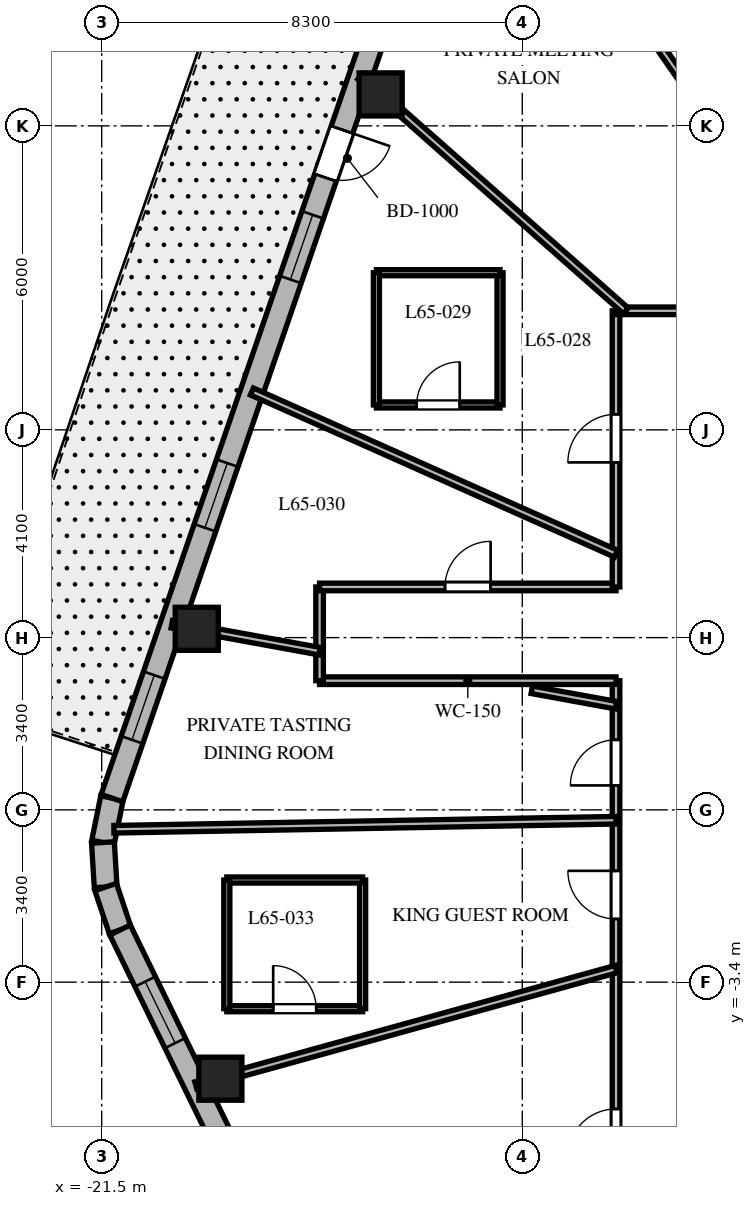
"""IFC4 building model, lengths in metres.
Left out: names, types, materials, properties, quantities, classifications, styles, units other than length and angle.
Written with IfcOpenShell. Run it as: python <this file> out.ifc"""

import sys

from ifc_helpers import new_model, si_unit, direction, frame, frame_2d, origin, origin_2d, place, context, subcontext, project, spatial, rectangle, extrude, element, fill, save


model = new_model("IFC4")
c1 = context("Model", 3, precision=1e-05, world=origin(), true_north=direction((0.0, 1.0)))
c2 = subcontext(c1, "Body", "Model", "MODEL_VIEW")
j1 = project(units=[si_unit("LENGTHUNIT", "METRE"), si_unit("PLANEANGLEUNIT", "RADIAN")], contexts=[c1])
p1 = place(None, origin())
s1 = spatial("IfcSite", under=j1, at=p1, CompositionType="ELEMENT")
p2 = place(p1, origin())
s2 = spatial("IfcBuilding", under=s1, at=p2, CompositionType="ELEMENT")
p3 = place(p2, frame((0.0, 0.0, 261.3)))
s3 = spatial("IfcBuildingStorey", under=s2, at=p3, CompositionType="ELEMENT", Elevation=261.3)
for number, where, z_axis, x_axis in (
    (1, (-15.995, 14.121, 0.0), (0.0, 0.0, 1.0), (1.0, 0.0, 0.0)),
    (2, (-19.624, 3.574, 0.0), (0.0, 0.0, 1.0), (1.0, 0.0, 0.0)),
    (3, (-19.158, -5.305, 0.0), (0.0, 0.0, 1.0), (1.0, 0.0, 0.0)),
):
    element("IfcColumn", number, at=place(p3, frame(where, z_axis=z_axis, x_axis=x_axis)), inside=s3, PredefinedType="COLUMN", context=c2, shape_type="SweptSolid", body=[
        extrude(rectangle(XDim=0.85, YDim=0.85, at=origin_2d()), origin(), (0.0, 0.0, 1.0), 3.9),
    ])
p4 = place(p3, frame((-21.298, 0.233, 0.0), z_axis=(0.0, 0.0, 1.0), x_axis=(-0.199158176661, -0.979967356941, 0.0)))
e4 = element("IfcWall", 4, at=p4, inside=s3, PredefinedType="SOLIDWALL", context=c2, shape_type="SweptSolid", body=[
    extrude(rectangle(XDim=0.895, YDim=0.45, at=frame_2d((0.447, 0.0))), origin(), (0.0, 0.0, 1.0), 3.6),
])
p5 = place(p3, frame((-21.476, -0.644, 0.0), z_axis=(0.0, 0.0, 1.0), x_axis=(0.061031097918, -0.998135865044, 0.0)))
e5 = element("IfcWall", 5, at=p5, inside=s3, PredefinedType="SOLIDWALL", context=c2, shape_type="SweptSolid", body=[
    extrude(rectangle(XDim=0.88, YDim=0.45, at=frame_2d((0.44, 0.0))), origin(), (0.0, 0.0, 1.0), 3.6),
])
p6 = place(p3, frame((-21.422, -1.522, 0.0), z_axis=(0.0, 0.0, 1.0), x_axis=(0.316964162323, -0.94843751497, 0.0)))
e6 = element("IfcWall", 6, at=p6, inside=s3, PredefinedType="SOLIDWALL", context=c2, shape_type="SweptSolid", body=[
    extrude(rectangle(XDim=0.895, YDim=0.45, at=frame_2d((0.448, 0.0))), origin(), (0.0, 0.0, 1.0), 3.6),
])
p7 = place(p3, frame((-15.26, 17.776, 0.0), z_axis=(0.0, 0.0, 1.0), x_axis=(-0.325407437101, -0.945573899745, 0.0)))
e7 = element("IfcWall", 7, at=p7, inside=s3, PredefinedType="SOLIDWALL", context=c2, shape_type="SweptSolid", body=[
    extrude(rectangle(XDim=18.552, YDim=0.45, at=frame_2d((9.276, 0.0))), origin(), (0.0, 0.0, 1.0), 3.6),
])
p8 = place(p7, frame((4.602, 0.0, 0.0)))
e8 = element("IfcOpeningElement", 8, at=p8, cuts=e7, PredefinedType="OPENING", context=c2, shape_type="SweptSolid", body=[
    extrude(rectangle(XDim=1.0, YDim=2.15, at=frame_2d((0.5, 1.075))), frame((0.0, 0.235, 0.0), z_axis=(0.0, -1.0, 0.0), x_axis=(1.0, 0.0, 0.0)), (0.0, 0.0, 1.0), 0.47),
])
p9 = place(p7, frame((1.161, 0.0, 0.8)))
e9 = element("IfcOpeningElement", 9, at=p9, cuts=e7, PredefinedType="OPENING", context=c2, shape_type="SweptSolid", body=[
    extrude(rectangle(XDim=1.35, YDim=1.75, at=frame_2d((0.675, 0.875))), frame((0.0, 0.235, 0.0), z_axis=(0.0, -1.0, 0.0), x_axis=(1.0, 0.0, 0.0)), (0.0, 0.0, 1.0), 0.47),
])
p10 = place(p7, frame((6.379, 0.0, 0.8)))
e10 = element("IfcOpeningElement", 10, at=p10, cuts=e7, PredefinedType="OPENING", context=c2, shape_type="SweptSolid", body=[
    extrude(rectangle(XDim=1.35, YDim=1.75, at=frame_2d((0.675, 0.875))), frame((0.0, 0.235, 0.0), z_axis=(0.0, -1.0, 0.0), x_axis=(1.0, 0.0, 0.0)), (0.0, 0.0, 1.0), 0.47),
])
p11 = place(p7, frame((11.561, 0.0, 0.8)))
e11 = element("IfcOpeningElement", 11, at=p11, cuts=e7, PredefinedType="OPENING", context=c2, shape_type="SweptSolid", body=[
    extrude(rectangle(XDim=1.35, YDim=1.75, at=frame_2d((0.675, 0.875))), frame((0.0, 0.235, 0.0), z_axis=(0.0, -1.0, 0.0), x_axis=(1.0, 0.0, 0.0)), (0.0, 0.0, 1.0), 0.47),
])
p12 = place(p7, frame((15.987, 0.0, 0.8)))
e12 = element("IfcOpeningElement", 12, at=p12, cuts=e7, PredefinedType="OPENING", context=c2, shape_type="SweptSolid", body=[
    extrude(rectangle(XDim=1.35, YDim=1.75, at=frame_2d((0.675, 0.875))), frame((0.0, 0.235, 0.0), z_axis=(0.0, -1.0, 0.0), x_axis=(1.0, 0.0, 0.0)), (0.0, 0.0, 1.0), 0.47),
])
p13 = place(p3, frame((-21.138, -2.371, 0.0), z_axis=(0.0, 0.0, 1.0), x_axis=(0.438128124058, -0.89891253574, 0.0)))
e13 = element("IfcWall", 13, at=p13, inside=s3, PredefinedType="SOLIDWALL", context=c2, shape_type="SweptSolid", body=[
    extrude(rectangle(XDim=17.565, YDim=0.45, at=frame_2d((8.782, 0.0))), origin(), (0.0, 0.0, 1.0), 3.6),
])
p14 = place(p13, frame((1.133, 0.0, 0.8)))
e14 = element("IfcOpeningElement", 14, at=p14, cuts=e13, PredefinedType="OPENING", context=c2, shape_type="SweptSolid", body=[
    extrude(rectangle(XDim=1.35, YDim=1.75, at=frame_2d((0.675, 0.875))), frame((0.0, 0.235, 0.0), z_axis=(0.0, -1.0, 0.0), x_axis=(1.0, 0.0, 0.0)), (0.0, 0.0, 1.0), 0.47),
])
p15 = place(p13, frame((8.158, 0.0, 0.8)))
e15 = element("IfcOpeningElement", 15, at=p15, cuts=e13, PredefinedType="OPENING", context=c2, shape_type="SweptSolid", body=[
    extrude(rectangle(XDim=1.35, YDim=1.75, at=frame_2d((0.675, 0.875))), frame((0.0, 0.235, 0.0), z_axis=(0.0, -1.0, 0.0), x_axis=(1.0, 0.0, 0.0)), (0.0, 0.0, 1.0), 0.47),
])
p16 = place(p13, frame((15.132, 0.0, 0.8)))
e16 = element("IfcOpeningElement", 16, at=p16, cuts=e13, PredefinedType="OPENING", context=c2, shape_type="SweptSolid", body=[
    extrude(rectangle(XDim=1.35, YDim=1.75, at=frame_2d((0.675, 0.875))), frame((0.0, 0.235, 0.0), z_axis=(0.0, -1.0, 0.0), x_axis=(1.0, 0.0, 0.0)), (0.0, 0.0, 1.0), 0.47),
])
p17 = place(p3, frame((-11.35, -9.85, 0.0), z_axis=(0.0, 0.0, 1.0), x_axis=(0.0, 1.0, 0.0)))
e17 = element("IfcWall", 17, at=p17, inside=s3, PredefinedType="PARTITIONING", context=c2, shape_type="SweptSolid", body=[
    extrude(rectangle(XDim=12.4, YDim=0.15, at=frame_2d((6.2, 0.0))), origin(), (0.0, 0.0, 1.0), 3.09),
])
p18 = place(p17, frame((10.333, 0.0, 0.0)))
e18 = element("IfcOpeningElement", 18, at=p18, cuts=e17, PredefinedType="OPENING", context=c2, shape_type="SweptSolid", body=[
    extrude(rectangle(XDim=0.9, YDim=2.03, at=frame_2d((0.45, 1.015))), frame((0.0, 0.085, 0.0), z_axis=(0.0, -1.0, 0.0), x_axis=(1.0, 0.0, 0.0)), (0.0, 0.0, 1.0), 0.17),
])
p19 = place(p17, frame((7.697, 0.0, 0.0)))
e19 = element("IfcOpeningElement", 19, at=p19, cuts=e17, PredefinedType="OPENING", context=c2, shape_type="SweptSolid", body=[
    extrude(rectangle(XDim=0.95, YDim=2.03, at=frame_2d((0.475, 1.015))), frame((0.0, 0.085, 0.0), z_axis=(0.0, -1.0, 0.0), x_axis=(1.0, 0.0, 0.0)), (0.0, 0.0, 1.0), 0.17),
])
p20 = place(p17, frame((2.998, 0.0, 0.0)))
e20 = element("IfcOpeningElement", 20, at=p20, cuts=e17, PredefinedType="OPENING", context=c2, shape_type="SweptSolid", body=[
    extrude(rectangle(XDim=0.95, YDim=2.03, at=frame_2d((0.475, 1.015))), frame((0.0, 0.085, 0.0), z_axis=(0.0, -1.0, 0.0), x_axis=(1.0, 0.0, 0.0)), (0.0, 0.0, 1.0), 0.17),
])
p21 = place(p3, frame((-11.35, 2.55, 0.0), z_axis=(0.0, 0.0, 1.0), x_axis=(-1.0, 0.0, 0.0)))
e21 = element("IfcWall", 21, at=p21, inside=s3, PredefinedType="PARTITIONING", context=c2, shape_type="SweptSolid", body=[
    extrude(rectangle(XDim=5.85, YDim=0.15, at=frame_2d((2.925, 0.0))), origin(), (0.0, 0.0, 1.0), 3.041),
])
p22 = place(p3, frame((-17.2, 2.55, 0.0), z_axis=(0.0, 0.0, 1.0), x_axis=(0.0, 1.0, 0.0)))
e22 = element("IfcWall", 22, at=p22, inside=s3, PredefinedType="PARTITIONING", context=c2, shape_type="SweptSolid", body=[
    extrude(rectangle(XDim=1.85, YDim=0.15, at=frame_2d((0.925, 0.0))), origin(), (0.0, 0.0, 1.0), 3.09),
])
p23 = place(p3, frame((-17.2, 4.4, 0.0), z_axis=(0.0, 0.0, 1.0), x_axis=(1.0, 0.0, 0.0)))
e23 = element("IfcWall", 23, at=p23, inside=s3, PredefinedType="PARTITIONING", context=c2, shape_type="SweptSolid", body=[
    extrude(rectangle(XDim=5.85, YDim=0.15, at=frame_2d((2.925, 0.0))), origin(), (0.0, 0.0, 1.0), 3.041),
])
p24 = place(p23, frame((2.475, 0.0, 0.0)))
e24 = element("IfcOpeningElement", 24, at=p24, cuts=e23, PredefinedType="OPENING", context=c2, shape_type="SweptSolid", body=[
    extrude(rectangle(XDim=0.9, YDim=2.03, at=frame_2d((0.45, 1.015))), frame((0.0, 0.085, 0.0), z_axis=(0.0, -1.0, 0.0), x_axis=(1.0, 0.0, 0.0)), (0.0, 0.0, 1.0), 0.17),
])
p25 = place(p3, frame((-11.35, 4.4, 0.0), z_axis=(0.0, 0.0, 1.0), x_axis=(0.0, 1.0, 0.0)))
e25 = element("IfcWall", 25, at=p25, inside=s3, PredefinedType="PARTITIONING", context=c2, shape_type="SweptSolid", body=[
    extrude(rectangle(XDim=5.45, YDim=0.15, at=frame_2d((2.725, 0.0))), origin(), (0.0, 0.0, 1.0), 3.09),
])
p26 = place(p25, frame((2.458, 0.0, 0.0)))
e26 = element("IfcOpeningElement", 26, at=p26, cuts=e25, PredefinedType="OPENING", context=c2, shape_type="SweptSolid", body=[
    extrude(rectangle(XDim=0.95, YDim=2.03, at=frame_2d((0.475, 1.015))), frame((0.0, 0.085, 0.0), z_axis=(0.0, -1.0, 0.0), x_axis=(1.0, 0.0, 0.0)), (0.0, 0.0, 1.0), 0.17),
])
p27 = place(p3, frame((-11.35, 9.85, 0.0), z_axis=(0.0, 0.0, 1.0), x_axis=(1.0, 0.0, 0.0)))
e27 = element("IfcWall", 27, at=p27, inside=s3, PredefinedType="PARTITIONING", context=c2, shape_type="SweptSolid", body=[
    extrude(rectangle(XDim=10.43, YDim=0.15, at=frame_2d((5.215, 0.0))), origin(), (0.0, 0.0, 1.0), 3.09),
])
p28 = place(p27, frame((8.382, 0.0, 0.0)))
e28 = element("IfcOpeningElement", 28, at=p28, cuts=e27, PredefinedType="OPENING", context=c2, shape_type="SweptSolid", body=[
    extrude(rectangle(XDim=0.95, YDim=2.03, at=frame_2d((0.475, 1.015))), frame((0.0, 0.085, 0.0), z_axis=(0.0, -1.0, 0.0), x_axis=(1.0, 0.0, 0.0)), (0.0, 0.0, 1.0), 0.17),
])
p29 = place(p27, frame((5.541, 0.0, 0.0)))
e29 = element("IfcOpeningElement", 29, at=p29, cuts=e27, PredefinedType="OPENING", context=c2, shape_type="SweptSolid", body=[
    extrude(rectangle(XDim=0.9, YDim=2.03, at=frame_2d((0.45, 1.015))), frame((0.0, 0.085, 0.0), z_axis=(0.0, -1.0, 0.0), x_axis=(1.0, 0.0, 0.0)), (0.0, 0.0, 1.0), 0.17),
])
p30 = place(p27, frame((1.916, 0.0, 0.0)))
e30 = element("IfcOpeningElement", 30, at=p30, cuts=e27, PredefinedType="OPENING", context=c2, shape_type="SweptSolid", body=[
    extrude(rectangle(XDim=0.9, YDim=2.03, at=frame_2d((0.45, 1.015))), frame((0.0, 0.085, 0.0), z_axis=(0.0, -1.0, 0.0), x_axis=(1.0, 0.0, 0.0)), (0.0, 0.0, 1.0), 0.17),
])
p31 = place(p3, frame((-6.858, 9.85, 0.0), z_axis=(0.0, 0.0, 1.0), x_axis=(-0.571391702066, 0.820677477948, 0.0)))
e31 = element("IfcWall", 31, at=p31, inside=s3, PredefinedType="PARTITIONING", context=c2, shape_type="SweptSolid", body=[
    extrude(rectangle(XDim=11.738, YDim=0.15, at=frame_2d((5.869, 0.0))), origin(), (0.0, 0.0, 1.0), 2.94),
])
p32 = place(p3, frame((-11.157, 9.85, 0.0), z_axis=(0.0, 0.0, 1.0), x_axis=(-0.74966962095, 0.661812253909, 0.0)))
e32 = element("IfcWall", 32, at=p32, inside=s3, PredefinedType="PARTITIONING", context=c2, shape_type="SweptSolid", body=[
    extrude(rectangle(XDim=6.989, YDim=0.15, at=frame_2d((3.494, 0.0))), origin(), (0.0, 0.0, 1.0), 2.94),
])
p33 = place(p3, frame((-11.35, 5.057, 0.0), z_axis=(0.0, 0.0, 1.0), x_axis=(-0.91344644156, 0.406958964026, 0.0)))
e33 = element("IfcWall", 33, at=p33, inside=s3, PredefinedType="PARTITIONING", context=c2, shape_type="SweptSolid", body=[
    extrude(rectangle(XDim=7.867, YDim=0.15, at=frame_2d((3.933, 0.0))), origin(), (0.0, 0.0, 1.0), 2.94),
])
p34 = place(p3, frame((-11.35, 2.067, 0.0), z_axis=(0.0, 0.0, 1.0), x_axis=(-0.983807459651, 0.179228575665, 0.0)))
e34 = element("IfcWall", 34, at=p34, inside=s3, PredefinedType="PARTITIONING", context=c2, shape_type="SweptSolid", body=[
    extrude(rectangle(XDim=1.69, YDim=0.15, at=frame_2d((0.845, 0.0))), origin(), (0.0, 0.0, 1.0), 3.6),
])
p35 = place(p3, frame((-17.2, 3.133, 0.0), z_axis=(0.0, 0.0, 1.0), x_axis=(-0.983817168797, 0.179175272791, 0.0)))
e35 = element("IfcWall", 35, at=p35, inside=s3, PredefinedType="PARTITIONING", context=c2, shape_type="SweptSolid", body=[
    extrude(rectangle(XDim=2.965, YDim=0.15, at=frame_2d((1.482, 0.0))), origin(), (0.0, 0.0, 1.0), 2.94),
])
p36 = place(p3, frame((-11.35, -0.204, 0.0), z_axis=(0.0, 0.0, 1.0), x_axis=(-0.999838748671, -0.017957635019, 0.0)))
e36 = element("IfcWall", 36, at=p36, inside=s3, PredefinedType="PARTITIONING", context=c2, shape_type="SweptSolid", body=[
    extrude(rectangle(XDim=9.911, YDim=0.15, at=frame_2d((4.956, 0.0))), origin(), (0.0, 0.0, 1.0), 2.94),
])
p37 = place(p3, frame((-11.35, -3.143, 0.0), z_axis=(0.0, 0.0, 1.0), x_axis=(-0.963731818141, -0.266872596386, 0.0)))
e37 = element("IfcWall", 37, at=p37, inside=s3, PredefinedType="PARTITIONING", context=c2, shape_type="SweptSolid", body=[
    extrude(rectangle(XDim=8.605, YDim=0.15, at=frame_2d((4.302, 0.0))), origin(), (0.0, 0.0, 1.0), 2.94),
])
p38 = place(p3, frame((-16.079, 7.992, 0.0), z_axis=(0.0, 0.0, 1.0), x_axis=(1.0, 0.0, 0.0)))
e38 = element("IfcWall", 38, at=p38, inside=s3, PredefinedType="PARTITIONING", context=c2, shape_type="SweptSolid", body=[
    extrude(rectangle(XDim=2.44, YDim=0.12, at=frame_2d((1.22, 0.0))), origin(), (0.0, 0.0, 1.0), 3.172),
])
p39 = place(p38, frame((0.795, 0.0, 0.0)))
e39 = element("IfcOpeningElement", 39, at=p39, cuts=e38, PredefinedType="OPENING", context=c2, shape_type="SweptSolid", body=[
    extrude(rectangle(XDim=0.85, YDim=2.03, at=frame_2d((0.425, 1.015))), frame((0.0, 0.07, 0.0), z_axis=(0.0, -1.0, 0.0), x_axis=(1.0, 0.0, 0.0)), (0.0, 0.0, 1.0), 0.14),
])
p40 = place(p3, frame((-13.639, 7.992, 0.0), z_axis=(0.0, 0.0, 1.0), x_axis=(0.0, 1.0, 0.0)))
e40 = element("IfcWall", 40, at=p40, inside=s3, PredefinedType="PARTITIONING", context=c2, shape_type="SweptSolid", body=[
    extrude(rectangle(XDim=2.61, YDim=0.12, at=frame_2d((1.305, 0.0))), origin(), (0.0, 0.0, 1.0), 3.6),
])
p41 = place(p3, frame((-13.639, 10.602, 0.0), z_axis=(0.0, 0.0, 1.0), x_axis=(-1.0, 0.0, 0.0)))
e41 = element("IfcWall", 41, at=p41, inside=s3, PredefinedType="PARTITIONING", context=c2, shape_type="SweptSolid", body=[
    extrude(rectangle(XDim=2.44, YDim=0.12, at=frame_2d((1.22, 0.0))), origin(), (0.0, 0.0, 1.0), 3.172),
])
p42 = place(p3, frame((-16.079, 10.602, 0.0), z_axis=(0.0, 0.0, 1.0), x_axis=(0.0, -1.0, 0.0)))
e42 = element("IfcWall", 42, at=p42, inside=s3, PredefinedType="PARTITIONING", context=c2, shape_type="SweptSolid", body=[
    extrude(rectangle(XDim=2.61, YDim=0.12, at=frame_2d((1.305, 0.0))), origin(), (0.0, 0.0, 1.0), 3.6),
])
p43 = place(p3, frame((-19.031, -3.924, 0.0), z_axis=(0.0, 0.0, 1.0), x_axis=(1.0, 0.0, 0.0)))
e43 = element("IfcWall", 43, at=p43, inside=s3, PredefinedType="PARTITIONING", context=c2, shape_type="SweptSolid", body=[
    extrude(rectangle(XDim=2.68, YDim=0.12, at=frame_2d((1.34, 0.0))), origin(), (0.0, 0.0, 1.0), 3.6),
])
p44 = place(p43, frame((0.915, 0.0, 0.0)))
e44 = element("IfcOpeningElement", 44, at=p44, cuts=e43, PredefinedType="OPENING", context=c2, shape_type="SweptSolid", body=[
    extrude(rectangle(XDim=0.85, YDim=2.03, at=frame_2d((0.425, 1.015))), frame((0.0, 0.07, 0.0), z_axis=(0.0, -1.0, 0.0), x_axis=(1.0, 0.0, 0.0)), (0.0, 0.0, 1.0), 0.14),
])
p45 = place(p3, frame((-16.351, -3.924, 0.0), z_axis=(0.0, 0.0, 1.0), x_axis=(0.0, 1.0, 0.0)))
e45 = element("IfcWall", 45, at=p45, inside=s3, PredefinedType="PARTITIONING", context=c2, shape_type="SweptSolid", body=[
    extrude(rectangle(XDim=2.54, YDim=0.12, at=frame_2d((1.27, 0.0))), origin(), (0.0, 0.0, 1.0), 3.6),
])
p46 = place(p3, frame((-16.351, -1.384, 0.0), z_axis=(0.0, 0.0, 1.0), x_axis=(-1.0, 0.0, 0.0)))
e46 = element("IfcWall", 46, at=p46, inside=s3, PredefinedType="PARTITIONING", context=c2, shape_type="SweptSolid", body=[
    extrude(rectangle(XDim=2.68, YDim=0.12, at=frame_2d((1.34, 0.0))), origin(), (0.0, 0.0, 1.0), 3.6),
])
p47 = place(p3, frame((-19.031, -1.384, 0.0), z_axis=(0.0, 0.0, 1.0), x_axis=(0.0, -1.0, 0.0)))
e47 = element("IfcWall", 47, at=p47, inside=s3, PredefinedType="PARTITIONING", context=c2, shape_type="SweptSolid", body=[
    extrude(rectangle(XDim=2.54, YDim=0.12, at=frame_2d((1.27, 0.0))), origin(), (0.0, 0.0, 1.0), 2.94),
])
p48 = place(p8, origin())
e48 = element("IfcDoor", 48, at=p48, inside=s3, OperationType="SINGLE_SWING_LEFT", PredefinedType="DOOR", context=c2, shape_type="SweptSolid", body=[
    extrude(rectangle(XDim=1.0, YDim=2.15, at=frame_2d((0.5, 1.075))), frame((0.0, 0.025, 0.0), z_axis=(0.0, -1.0, 0.0), x_axis=(1.0, 0.0, 0.0)), (0.0, 0.0, 1.0), 0.05),
])
fill(e8, e48)
p49 = place(p10, origin())
e49 = element("IfcWindow", 49, at=p49, inside=s3, PartitioningType="SINGLE_PANEL", PredefinedType="WINDOW", context=c2, shape_type="SweptSolid", body=[
    extrude(rectangle(XDim=1.35, YDim=1.75, at=frame_2d((0.675, 0.875))), frame((0.0, 0.03, 0.0), z_axis=(0.0, -1.0, 0.0), x_axis=(1.0, 0.0, 0.0)), (0.0, 0.0, 1.0), 0.06),
])
fill(e10, e49)
p50 = place(p11, origin())
e50 = element("IfcWindow", 50, at=p50, inside=s3, PartitioningType="SINGLE_PANEL", PredefinedType="WINDOW", context=c2, shape_type="SweptSolid", body=[
    extrude(rectangle(XDim=1.35, YDim=1.75, at=frame_2d((0.675, 0.875))), frame((0.0, 0.03, 0.0), z_axis=(0.0, -1.0, 0.0), x_axis=(1.0, 0.0, 0.0)), (0.0, 0.0, 1.0), 0.06),
])
fill(e11, e50)
p51 = place(p12, origin())
e51 = element("IfcWindow", 51, at=p51, inside=s3, PartitioningType="SINGLE_PANEL", PredefinedType="WINDOW", context=c2, shape_type="SweptSolid", body=[
    extrude(rectangle(XDim=1.35, YDim=1.75, at=frame_2d((0.675, 0.875))), frame((0.0, 0.03, 0.0), z_axis=(0.0, -1.0, 0.0), x_axis=(1.0, 0.0, 0.0)), (0.0, 0.0, 1.0), 0.06),
])
fill(e12, e51)
p52 = place(p14, origin())
e52 = element("IfcWindow", 52, at=p52, inside=s3, PartitioningType="SINGLE_PANEL", PredefinedType="WINDOW", context=c2, shape_type="SweptSolid", body=[
    extrude(rectangle(XDim=1.35, YDim=1.75, at=frame_2d((0.675, 0.875))), frame((0.0, 0.03, 0.0), z_axis=(0.0, -1.0, 0.0), x_axis=(1.0, 0.0, 0.0)), (0.0, 0.0, 1.0), 0.06),
])
fill(e14, e52)
p53 = place(p26, origin())
e53 = element("IfcDoor", 53, at=p53, inside=s3, OperationType="SINGLE_SWING_LEFT", PredefinedType="DOOR", context=c2, shape_type="SweptSolid", body=[
    extrude(rectangle(XDim=0.95, YDim=2.03, at=frame_2d((0.475, 1.015))), frame((0.0, 0.025, 0.0), z_axis=(0.0, -1.0, 0.0), x_axis=(1.0, 0.0, 0.0)), (0.0, 0.0, 1.0), 0.05),
])
fill(e26, e53)
p54 = place(p39, origin())
e54 = element("IfcDoor", 54, at=p54, inside=s3, OperationType="SINGLE_SWING_RIGHT", PredefinedType="DOOR", context=c2, shape_type="SweptSolid", body=[
    extrude(rectangle(XDim=0.85, YDim=2.03, at=frame_2d((0.425, 1.015))), frame((0.0, 0.025, 0.0), z_axis=(0.0, -1.0, 0.0), x_axis=(1.0, 0.0, 0.0)), (0.0, 0.0, 1.0), 0.05),
])
fill(e39, e54)
p55 = place(p24, origin())
e55 = element("IfcDoor", 55, at=p55, inside=s3, OperationType="SINGLE_SWING_RIGHT", PredefinedType="DOOR", context=c2, shape_type="SweptSolid", body=[
    extrude(rectangle(XDim=0.9, YDim=2.03, at=frame_2d((0.45, 1.015))), frame((0.0, 0.025, 0.0), z_axis=(0.0, -1.0, 0.0), x_axis=(1.0, 0.0, 0.0)), (0.0, 0.0, 1.0), 0.05),
])
fill(e24, e55)
p56 = place(p18, origin())
e56 = element("IfcDoor", 56, at=p56, inside=s3, OperationType="SINGLE_SWING_LEFT", PredefinedType="DOOR", context=c2, shape_type="SweptSolid", body=[
    extrude(rectangle(XDim=0.9, YDim=2.03, at=frame_2d((0.45, 1.015))), frame((0.0, 0.025, 0.0), z_axis=(0.0, -1.0, 0.0), x_axis=(1.0, 0.0, 0.0)), (0.0, 0.0, 1.0), 0.05),
])
fill(e18, e56)
p57 = place(p19, origin())
e57 = element("IfcDoor", 57, at=p57, inside=s3, OperationType="SINGLE_SWING_RIGHT", PredefinedType="DOOR", context=c2, shape_type="SweptSolid", body=[
    extrude(rectangle(XDim=0.95, YDim=2.03, at=frame_2d((0.475, 1.015))), frame((0.0, 0.025, 0.0), z_axis=(0.0, -1.0, 0.0), x_axis=(1.0, 0.0, 0.0)), (0.0, 0.0, 1.0), 0.05),
])
fill(e19, e57)
p58 = place(p44, origin())
e58 = element("IfcDoor", 58, at=p58, inside=s3, OperationType="SINGLE_SWING_LEFT", PredefinedType="DOOR", context=c2, shape_type="SweptSolid", body=[
    extrude(rectangle(XDim=0.85, YDim=2.03, at=frame_2d((0.425, 1.015))), frame((0.0, 0.025, 0.0), z_axis=(0.0, -1.0, 0.0), x_axis=(1.0, 0.0, 0.0)), (0.0, 0.0, 1.0), 0.05),
])
fill(e44, e58)
p59 = place(p20, origin())
e59 = element("IfcDoor", 59, at=p59, inside=s3, OperationType="SINGLE_SWING_LEFT", PredefinedType="DOOR", context=c2, shape_type="SweptSolid", body=[
    extrude(rectangle(XDim=0.95, YDim=2.03, at=frame_2d((0.475, 1.015))), frame((0.0, 0.025, 0.0), z_axis=(0.0, -1.0, 0.0), x_axis=(1.0, 0.0, 0.0)), (0.0, 0.0, 1.0), 0.05),
])
fill(e20, e59)
save(model, sys.argv[1])
